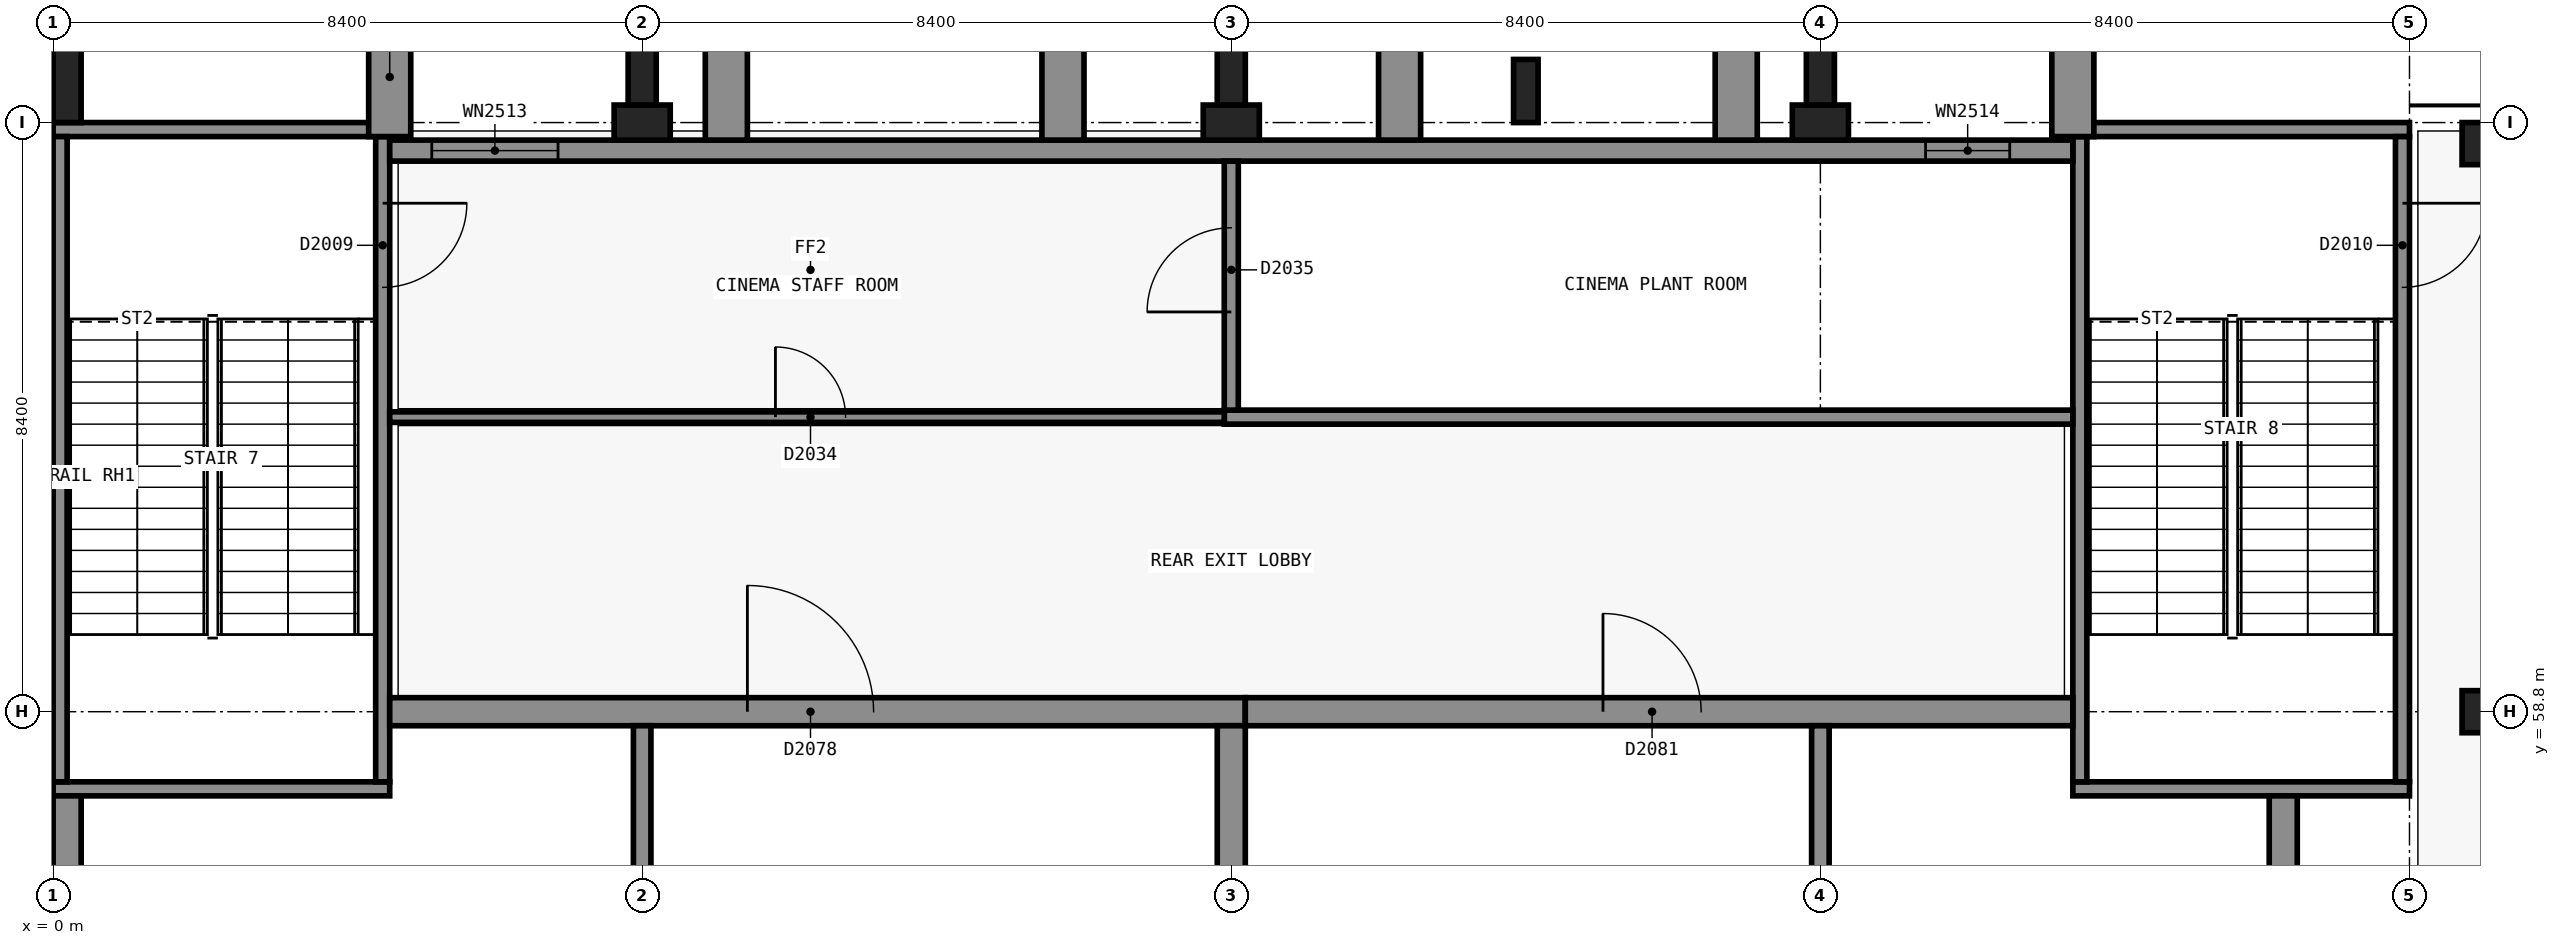
"""IFC4 building model, lengths in metres.
Left out: names, types, materials, properties, quantities, classifications, styles, units other than length and angle.
Written with IfcOpenShell. Run it as: python <this file> out.ifc"""

import sys

from ifc_helpers import new_model, si_unit, direction, frame, frame_2d, origin, origin_2d, place, context, subcontext, project, spatial, polyline, rectangle, outline, extrude, element, fill, save


model = new_model("IFC4")
c1 = context("Model", 3, precision=1e-05, world=origin(), true_north=direction((0.0, 1.0)))
c2 = subcontext(c1, "Body", "Model", "MODEL_VIEW")
j1 = project(units=[si_unit("LENGTHUNIT", "METRE"), si_unit("PLANEANGLEUNIT", "RADIAN")], contexts=[c1])
p1 = place(None, origin())
s1 = spatial("IfcSite", under=j1, at=p1, CompositionType="ELEMENT")
p2 = place(p1, origin())
s2 = spatial("IfcBuilding", under=s1, at=p2, CompositionType="ELEMENT")
p3 = place(p2, frame((0.0, 0.0, 10.2)))
s3 = spatial("IfcBuildingStorey", under=s2, at=p3, CompositionType="ELEMENT", Elevation=10.2)
for number, where, z_axis, x_axis in (
    (1, (4.8, 57.7, 0.0), (0.0, 0.0, 1.0), (-1.0, 0.0, 0.0)),
    (2, (0.0, 67.1, 0.0), (0.0, 0.0, 1.0), (1.0, 0.0, 0.0)),
):
    element("IfcWall", number, at=place(p3, frame(where, z_axis=z_axis, x_axis=x_axis)), inside=s3, PredefinedType="SHEAR", context=c2, shape_type="SweptSolid", body=[
        extrude(rectangle(XDim=4.8, YDim=0.2, at=frame_2d((2.4, 0.0))), origin(), (0.0, 0.0, 1.0), 4.8),
    ])
p4 = place(p3, frame((0.1, 57.8, 0.0), z_axis=(0.0, 0.0, 1.0), x_axis=(0.0, 1.0, 0.0)))
e3 = element("IfcWall", 3, at=p4, inside=s3, PredefinedType="SHEAR", context=c2, shape_type="SweptSolid", body=[
    extrude(rectangle(XDim=9.2, YDim=0.2, at=frame_2d((4.6, 0.0))), origin(), (0.0, 0.0, 1.0), 4.8),
])
p5 = place(p3, frame((4.7, 67.0, 0.0), z_axis=(0.0, 0.0, 1.0), x_axis=(0.0, -1.0, 0.0)))
e4 = element("IfcWall", 4, at=p5, inside=s3, PredefinedType="SHEAR", context=c2, shape_type="SweptSolid", body=[
    extrude(rectangle(XDim=9.2, YDim=0.2, at=frame_2d((4.6, 0.0))), origin(), (0.0, 0.0, 1.0), 4.8),
])
p6 = place(p5, frame((0.95, 0.0, 0.0)))
e5 = element("IfcOpeningElement", 5, at=p6, cuts=e4, PredefinedType="OPENING", context=c2, shape_type="SweptSolid", body=[
    extrude(rectangle(XDim=1.2, YDim=2.1, at=frame_2d((0.6, 1.05))), frame((0.0, 0.11, 0.0), z_axis=(0.0, -1.0, 0.0), x_axis=(1.0, 0.0, 0.0)), (0.0, 0.0, 1.0), 0.22),
])
for number, where, z_axis, x_axis in (
    (6, (33.6, 57.7, 0.0), (0.0, 0.0, 1.0), (-1.0, 0.0, 0.0)),
    (7, (28.8, 67.1, 0.0), (0.0, 0.0, 1.0), (1.0, 0.0, 0.0)),
):
    element("IfcWall", number, at=place(p3, frame(where, z_axis=z_axis, x_axis=x_axis)), inside=s3, PredefinedType="SHEAR", context=c2, shape_type="SweptSolid", body=[
        extrude(rectangle(XDim=4.8, YDim=0.2, at=frame_2d((2.4, 0.0))), origin(), (0.0, 0.0, 1.0), 4.8),
    ])
p7 = place(p3, frame((28.9, 57.8, 0.0), z_axis=(0.0, 0.0, 1.0), x_axis=(0.0, 1.0, 0.0)))
e8 = element("IfcWall", 8, at=p7, inside=s3, PredefinedType="SHEAR", context=c2, shape_type="SweptSolid", body=[
    extrude(rectangle(XDim=9.2, YDim=0.2, at=frame_2d((4.6, 0.0))), origin(), (0.0, 0.0, 1.0), 4.8),
])
p8 = place(p3, frame((33.5, 67.0, 0.0), z_axis=(0.0, 0.0, 1.0), x_axis=(0.0, -1.0, 0.0)))
e9 = element("IfcWall", 9, at=p8, inside=s3, PredefinedType="SHEAR", context=c2, shape_type="SweptSolid", body=[
    extrude(rectangle(XDim=9.2, YDim=0.2, at=frame_2d((4.6, 0.0))), origin(), (0.0, 0.0, 1.0), 4.8),
])
p9 = place(p8, frame((0.95, 0.0, 0.0)))
e10 = element("IfcOpeningElement", 10, at=p9, cuts=e9, PredefinedType="OPENING", context=c2, shape_type="SweptSolid", body=[
    extrude(rectangle(XDim=1.2, YDim=2.1, at=frame_2d((0.6, 1.05))), frame((0.0, 0.11, 0.0), z_axis=(0.0, -1.0, 0.0), x_axis=(1.0, 0.0, 0.0)), (0.0, 0.0, 1.0), 0.22),
])
p10 = place(p3, frame((4.8, 58.8, 0.0), z_axis=(0.0, 0.0, 1.0), x_axis=(1.0, 0.0, 0.0)))
e11 = element("IfcWall", 11, at=p10, inside=s3, PredefinedType="SHEAR", context=c2, shape_type="SweptSolid", body=[
    extrude(rectangle(XDim=12.2, YDim=0.4, at=frame_2d((6.1, 0.0))), origin(), (0.0, 0.0, 1.0), 4.8),
])
p11 = place(p10, frame((5.1, 0.0, 0.0)))
e12 = element("IfcOpeningElement", 12, at=p11, cuts=e11, PredefinedType="OPENING", context=c2, shape_type="SweptSolid", body=[
    extrude(rectangle(XDim=1.8, YDim=2.1, at=frame_2d((0.9, 1.05))), frame((0.0, 0.21, 0.0), z_axis=(0.0, -1.0, 0.0), x_axis=(1.0, 0.0, 0.0)), (0.0, 0.0, 1.0), 0.42),
])
p12 = place(p3, frame((0.2, 43.2, 0.0), z_axis=(0.0, 0.0, 1.0), x_axis=(0.0, 1.0, 0.0)))
e13 = element("IfcWall", 13, at=p12, inside=s3, PredefinedType="SHEAR", context=c2, shape_type="SweptSolid", body=[
    extrude(rectangle(XDim=14.4, YDim=0.4, at=frame_2d((7.2, 0.0))), origin(), (0.0, 0.0, 1.0), 4.8),
])
p13 = place(p3, frame((16.8, 58.6, 0.0), z_axis=(0.0, 0.0, 1.0), x_axis=(0.0, -1.0, 0.0)))
e14 = element("IfcWall", 14, at=p13, inside=s3, PredefinedType="SHEAR", context=c2, shape_type="SweptSolid", body=[
    extrude(rectangle(XDim=16.4, YDim=0.4, at=frame_2d((8.2, 0.0))), origin(), (0.0, 0.0, 1.0), 4.8),
])
p14 = place(p3, frame((17.0, 58.8, 0.0), z_axis=(0.0, 0.0, 1.0), x_axis=(1.0, 0.0, 0.0)))
e15 = element("IfcWall", 15, at=p14, inside=s3, PredefinedType="SHEAR", context=c2, shape_type="SweptSolid", body=[
    extrude(rectangle(XDim=11.8, YDim=0.4, at=frame_2d((5.9, 0.0))), origin(), (0.0, 0.0, 1.0), 4.8),
])
p15 = place(p14, frame((5.1, 0.0, 0.0)))
e16 = element("IfcOpeningElement", 16, at=p15, cuts=e15, PredefinedType="OPENING", context=c2, shape_type="SweptSolid", body=[
    extrude(rectangle(XDim=1.4, YDim=2.1, at=frame_2d((0.7, 1.05))), frame((0.0, 0.21, 0.0), z_axis=(0.0, -1.0, 0.0), x_axis=(1.0, 0.0, 0.0)), (0.0, 0.0, 1.0), 0.42),
])
p16 = place(p3, frame((31.8, 57.6, 0.0), z_axis=(0.0, 0.0, 1.0), x_axis=(0.0, -1.0, 0.0)))
e17 = element("IfcWall", 17, at=p16, inside=s3, PredefinedType="SHEAR", context=c2, shape_type="SweptSolid", body=[
    extrude(rectangle(XDim=15.4, YDim=0.4, at=frame_2d((7.7, 0.0))), origin(), (0.0, 0.0, 1.0), 4.8),
])
for number, where, z_axis, x_axis in (
    (18, (8.4, 43.1, 0.0), (0.0, 0.0, 1.0), (0.0, 1.0, 0.0)),
    (19, (25.2, 43.1, 0.0), (0.0, 0.0, 1.0), (0.0, 1.0, 0.0)),
):
    element("IfcWall", number, at=place(p3, frame(where, z_axis=z_axis, x_axis=x_axis)), inside=s3, PredefinedType="SOLIDWALL", context=c2, shape_type="SweptSolid", body=[
        extrude(outline(polyline([(0.0, 0.0), (15.5, 0.0), (15.5, 2.324), (0.0, 0.154), (0.0, 0.0)])), frame((0.0, 0.125, 0.0), z_axis=(0.0, -1.0, 0.0), x_axis=(1.0, 0.0, 0.0)), (0.0, 0.0, 1.0), 0.25),
    ])
for number, where, z_axis, x_axis in (
    (20, (8.4, 67.2, 0.0), (0.0, 0.0, 1.0), (1.0, 0.0, 0.0)),
    (21, (16.8, 67.2, 0.0), (0.0, 0.0, 1.0), (1.0, 0.0, 0.0)),
    (22, (25.2, 67.2, 0.0), (0.0, 0.0, 1.0), (1.0, 0.0, 0.0)),
):
    element("IfcColumn", number, at=place(p3, frame(where, z_axis=z_axis, x_axis=x_axis)), inside=s3, PredefinedType="COLUMN", context=c2, shape_type="SweptSolid", body=[
        extrude(rectangle(XDim=0.8, YDim=0.5, at=origin_2d()), origin(), (0.0, 0.0, 1.0), 4.8),
    ])
for number, where, z_axis, x_axis in (
    (23, (34.65, 58.8, 0.0), (0.0, 0.0, 1.0), (1.0, 0.0, 0.0)),
    (24, (34.65, 66.9, 0.0), (0.0, 0.0, 1.0), (1.0, 0.0, 0.0)),
):
    element("IfcColumn", number, at=place(p3, frame(where, z_axis=z_axis, x_axis=x_axis)), inside=s3, PredefinedType="COLUMN", context=c2, shape_type="SweptSolid", body=[
        extrude(rectangle(XDim=0.6, YDim=0.6, at=origin_2d()), origin(), (0.0, 0.0, 1.0), 4.8),
    ])
p17 = place(p3, frame((4.8, 66.8, 0.0), z_axis=(0.0, 0.0, 1.0), x_axis=(1.0, 0.0, 0.0)))
e25 = element("IfcWall", 25, at=p17, inside=s3, PredefinedType="SOLIDWALL", context=c2, shape_type="SweptSolid", body=[
    extrude(rectangle(XDim=24.0, YDim=0.3, at=frame_2d((12.0, 0.0))), origin(), (0.0, 0.0, 1.0), 4.5),
])
p18 = place(p17, frame((0.6, 0.0, 0.9)))
e26 = element("IfcOpeningElement", 26, at=p18, cuts=e25, PredefinedType="OPENING", context=c2, shape_type="SweptSolid", body=[
    extrude(rectangle(XDim=1.8, YDim=1.5, at=frame_2d((0.9, 0.75))), frame((0.0, 0.16, 0.0), z_axis=(0.0, -1.0, 0.0), x_axis=(1.0, 0.0, 0.0)), (0.0, 0.0, 1.0), 0.32),
])
p19 = place(p17, frame((21.9, 0.0, 0.9)))
e27 = element("IfcOpeningElement", 27, at=p19, cuts=e25, PredefinedType="OPENING", context=c2, shape_type="SweptSolid", body=[
    extrude(rectangle(XDim=1.2, YDim=1.8, at=frame_2d((0.6, 0.9))), frame((0.0, 0.16, 0.0), z_axis=(0.0, -1.0, 0.0), x_axis=(1.0, 0.0, 0.0)), (0.0, 0.0, 1.0), 0.32),
])
for number, where, z_axis, x_axis in (
    (28, (0.2, 67.8, 0.0), (0.0, 0.0, 1.0), (1.0, 0.0, 0.0)),
    (29, (8.4, 68.05, 0.0), (0.0, 0.0, 1.0), (1.0, 0.0, 0.0)),
    (30, (16.8, 68.05, 0.0), (0.0, 0.0, 1.0), (1.0, 0.0, 0.0)),
):
    element("IfcColumn", number, at=place(p3, frame(where, z_axis=z_axis, x_axis=x_axis)), inside=s3, PredefinedType="PILASTER", context=c2, shape_type="SweptSolid", body=[
        extrude(rectangle(XDim=0.4, YDim=1.2, at=origin_2d()), origin(), (0.0, 0.0, 1.0), 4.8),
    ])
p20 = place(p3, frame((21.0, 67.65, 0.0), z_axis=(0.0, 0.0, 1.0), x_axis=(1.0, 0.0, 0.0)))
e31 = element("IfcColumn", 31, at=p20, inside=s3, PredefinedType="PILASTER", context=c2, shape_type="SweptSolid", body=[
    extrude(rectangle(XDim=0.35, YDim=0.9, at=origin_2d()), origin(), (0.0, 0.0, 1.0), 4.8),
])
p21 = place(p3, frame((25.2, 68.05, 0.0), z_axis=(0.0, 0.0, 1.0), x_axis=(1.0, 0.0, 0.0)))
e32 = element("IfcColumn", 32, at=p21, inside=s3, PredefinedType="PILASTER", context=c2, shape_type="SweptSolid", body=[
    extrude(rectangle(XDim=0.4, YDim=1.2, at=origin_2d()), origin(), (0.0, 0.0, 1.0), 4.8),
])
p22 = place(p3, frame((4.8, 67.0, 0.0), z_axis=(0.0, 0.0, 1.0), x_axis=(0.0, 1.0, 0.0)))
e33 = element("IfcWall", 33, at=p22, inside=s3, PredefinedType="SOLIDWALL", context=c2, shape_type="SweptSolid", body=[
    extrude(rectangle(XDim=1.7, YDim=0.6, at=frame_2d((0.85, 0.0))), origin(), (0.0, 0.0, 1.0), 4.8),
])
for number, where, z_axis, x_axis in (
    (34, (9.6, 66.95, 0.0), (0.0, 0.0, 1.0), (0.0, 1.0, 0.0)),
    (35, (14.4, 66.95, 0.0), (0.0, 0.0, 1.0), (0.0, 1.0, 0.0)),
    (36, (19.2, 66.95, 0.0), (0.0, 0.0, 1.0), (0.0, 1.0, 0.0)),
    (37, (24.0, 66.95, 0.0), (0.0, 0.0, 1.0), (0.0, 1.0, 0.0)),
):
    element("IfcWall", number, at=place(p3, frame(where, z_axis=z_axis, x_axis=x_axis)), inside=s3, PredefinedType="SOLIDWALL", context=c2, shape_type="SweptSolid", body=[
        extrude(rectangle(XDim=1.75, YDim=0.6, at=frame_2d((0.875, 0.0))), origin(), (0.0, 0.0, 1.0), 4.8),
    ])
p23 = place(p3, frame((28.8, 67.0, 0.0), z_axis=(0.0, 0.0, 1.0), x_axis=(0.0, 1.0, 0.0)))
e38 = element("IfcWall", 38, at=p23, inside=s3, PredefinedType="SOLIDWALL", context=c2, shape_type="SweptSolid", body=[
    extrude(rectangle(XDim=1.7, YDim=0.6, at=frame_2d((0.85, 0.0))), origin(), (0.0, 0.0, 1.0), 4.8),
])
p24 = place(p3, frame((16.7, 63.0, 0.0), z_axis=(0.0, 0.0, 1.0), x_axis=(1.0, 0.0, 0.0)))
e39 = element("IfcWall", 39, at=p24, inside=s3, PredefinedType="SOLIDWALL", context=c2, shape_type="SweptSolid", body=[
    extrude(rectangle(XDim=12.1, YDim=0.2, at=frame_2d((6.05, 0.0))), origin(), (0.0, 0.0, 1.0), 3.8),
])
p25 = place(p3, frame((16.8, 63.1, 0.0), z_axis=(0.0, 0.0, 1.0), x_axis=(0.0, 1.0, 0.0)))
e40 = element("IfcWall", 40, at=p25, inside=s3, PredefinedType="SOLIDWALL", context=c2, shape_type="SweptSolid", body=[
    extrude(rectangle(XDim=3.55, YDim=0.2, at=frame_2d((1.775, 0.0))), origin(), (0.0, 0.0, 1.0), 3.8),
])
p26 = place(p25, frame((1.4, 0.0, 0.0)))
e41 = element("IfcOpeningElement", 41, at=p26, cuts=e40, PredefinedType="OPENING", context=c2, shape_type="SweptSolid", body=[
    extrude(rectangle(XDim=1.2, YDim=2.1, at=frame_2d((0.6, 1.05))), frame((0.0, 0.11, 0.0), z_axis=(0.0, -1.0, 0.0), x_axis=(1.0, 0.0, 0.0)), (0.0, 0.0, 1.0), 0.22),
])
p27 = place(p3, frame((16.8, 66.95, 0.0), z_axis=(0.0, 0.0, 1.0), x_axis=(0.0, 1.0, 0.0)))
e42 = element("IfcWall", 42, at=p27, inside=s3, PredefinedType="SOLIDWALL", context=c2, shape_type="SweptSolid", body=[
    extrude(rectangle(XDim=0.35, YDim=0.2, at=frame_2d((0.175, 0.0))), origin(), (0.0, 0.0, 1.0), 3.8),
])
p28 = place(p3, frame((4.8, 63.0, 0.0), z_axis=(0.0, 0.0, 1.0), x_axis=(1.0, 0.0, 0.0)))
e43 = element("IfcWall", 43, at=p28, inside=s3, PredefinedType="PARTITIONING", context=c2, shape_type="SweptSolid", body=[
    extrude(rectangle(XDim=11.9, YDim=0.15, at=frame_2d((5.95, 0.0))), origin(), (0.0, 0.0, 1.0), 3.8),
])
p29 = place(p28, frame((5.5, 0.0, 0.0)))
e44 = element("IfcOpeningElement", 44, at=p29, cuts=e43, PredefinedType="OPENING", context=c2, shape_type="SweptSolid", body=[
    extrude(rectangle(XDim=1.0, YDim=2.1, at=frame_2d((0.5, 1.05))), frame((0.0, 0.085, 0.0), z_axis=(0.0, -1.0, 0.0), x_axis=(1.0, 0.0, 0.0)), (0.0, 0.0, 1.0), 0.17),
])
p30 = place(p18, origin())
e45 = element("IfcWindow", 45, at=p30, inside=s3, PartitioningType="SINGLE_PANEL", PredefinedType="WINDOW", context=c2, shape_type="SweptSolid", body=[
    extrude(rectangle(XDim=1.8, YDim=1.5, at=frame_2d((0.9, 0.75))), frame((0.0, 0.03, 0.0), z_axis=(0.0, -1.0, 0.0), x_axis=(1.0, 0.0, 0.0)), (0.0, 0.0, 1.0), 0.06),
])
fill(e26, e45)
p31 = place(p19, origin())
e46 = element("IfcWindow", 46, at=p31, inside=s3, PartitioningType="SINGLE_PANEL", PredefinedType="WINDOW", context=c2, shape_type="SweptSolid", body=[
    extrude(rectangle(XDim=1.2, YDim=1.8, at=frame_2d((0.6, 0.9))), frame((0.0, 0.03, 0.0), z_axis=(0.0, -1.0, 0.0), x_axis=(1.0, 0.0, 0.0)), (0.0, 0.0, 1.0), 0.06),
])
fill(e27, e46)
p32 = place(p6, origin())
e47 = element("IfcDoor", 47, at=p32, inside=s3, OperationType="SINGLE_SWING_RIGHT", PredefinedType="DOOR", context=c2, shape_type="SweptSolid", body=[
    extrude(rectangle(XDim=1.2, YDim=2.1, at=frame_2d((0.6, 1.05))), frame((0.0, 0.025, 0.0), z_axis=(0.0, -1.0, 0.0), x_axis=(1.0, 0.0, 0.0)), (0.0, 0.0, 1.0), 0.05),
])
fill(e5, e47)
p33 = place(p9, origin())
e48 = element("IfcDoor", 48, at=p33, inside=s3, OperationType="SINGLE_SWING_RIGHT", PredefinedType="DOOR", context=c2, shape_type="SweptSolid", body=[
    extrude(rectangle(XDim=1.2, YDim=2.1, at=frame_2d((0.6, 1.05))), frame((0.0, 0.025, 0.0), z_axis=(0.0, -1.0, 0.0), x_axis=(1.0, 0.0, 0.0)), (0.0, 0.0, 1.0), 0.05),
])
fill(e10, e48)
p34 = place(p29, origin())
e49 = element("IfcDoor", 49, at=p34, inside=s3, OperationType="SINGLE_SWING_RIGHT", PredefinedType="DOOR", context=c2, shape_type="SweptSolid", body=[
    extrude(rectangle(XDim=1.0, YDim=2.1, at=frame_2d((0.5, 1.05))), frame((0.0, 0.025, 0.0), z_axis=(0.0, -1.0, 0.0), x_axis=(1.0, 0.0, 0.0)), (0.0, 0.0, 1.0), 0.05),
])
fill(e44, e49)
p35 = place(p26, origin())
e50 = element("IfcDoor", 50, at=p35, inside=s3, OperationType="SINGLE_SWING_LEFT", PredefinedType="DOOR", context=c2, shape_type="SweptSolid", body=[
    extrude(rectangle(XDim=1.2, YDim=2.1, at=frame_2d((0.6, 1.05))), frame((0.0, 0.025, 0.0), z_axis=(0.0, -1.0, 0.0), x_axis=(1.0, 0.0, 0.0)), (0.0, 0.0, 1.0), 0.05),
])
fill(e41, e50)
p36 = place(p11, origin())
e51 = element("IfcDoor", 51, at=p36, inside=s3, OperationType="DOUBLE_DOOR_SINGLE_SWING", PredefinedType="DOOR", context=c2, shape_type="SweptSolid", body=[
    extrude(rectangle(XDim=1.8, YDim=2.1, at=frame_2d((0.9, 1.05))), frame((0.0, 0.025, 0.0), z_axis=(0.0, -1.0, 0.0), x_axis=(1.0, 0.0, 0.0)), (0.0, 0.0, 1.0), 0.05),
])
fill(e12, e51)
p37 = place(p15, origin())
e52 = element("IfcDoor", 52, at=p37, inside=s3, OperationType="DOUBLE_DOOR_SINGLE_SWING", PredefinedType="DOOR", context=c2, shape_type="SweptSolid", body=[
    extrude(rectangle(XDim=1.4, YDim=2.1, at=frame_2d((0.7, 1.05))), frame((0.0, 0.025, 0.0), z_axis=(0.0, -1.0, 0.0), x_axis=(1.0, 0.0, 0.0)), (0.0, 0.0, 1.0), 0.05),
])
fill(e16, e52)
save(model, sys.argv[1])
